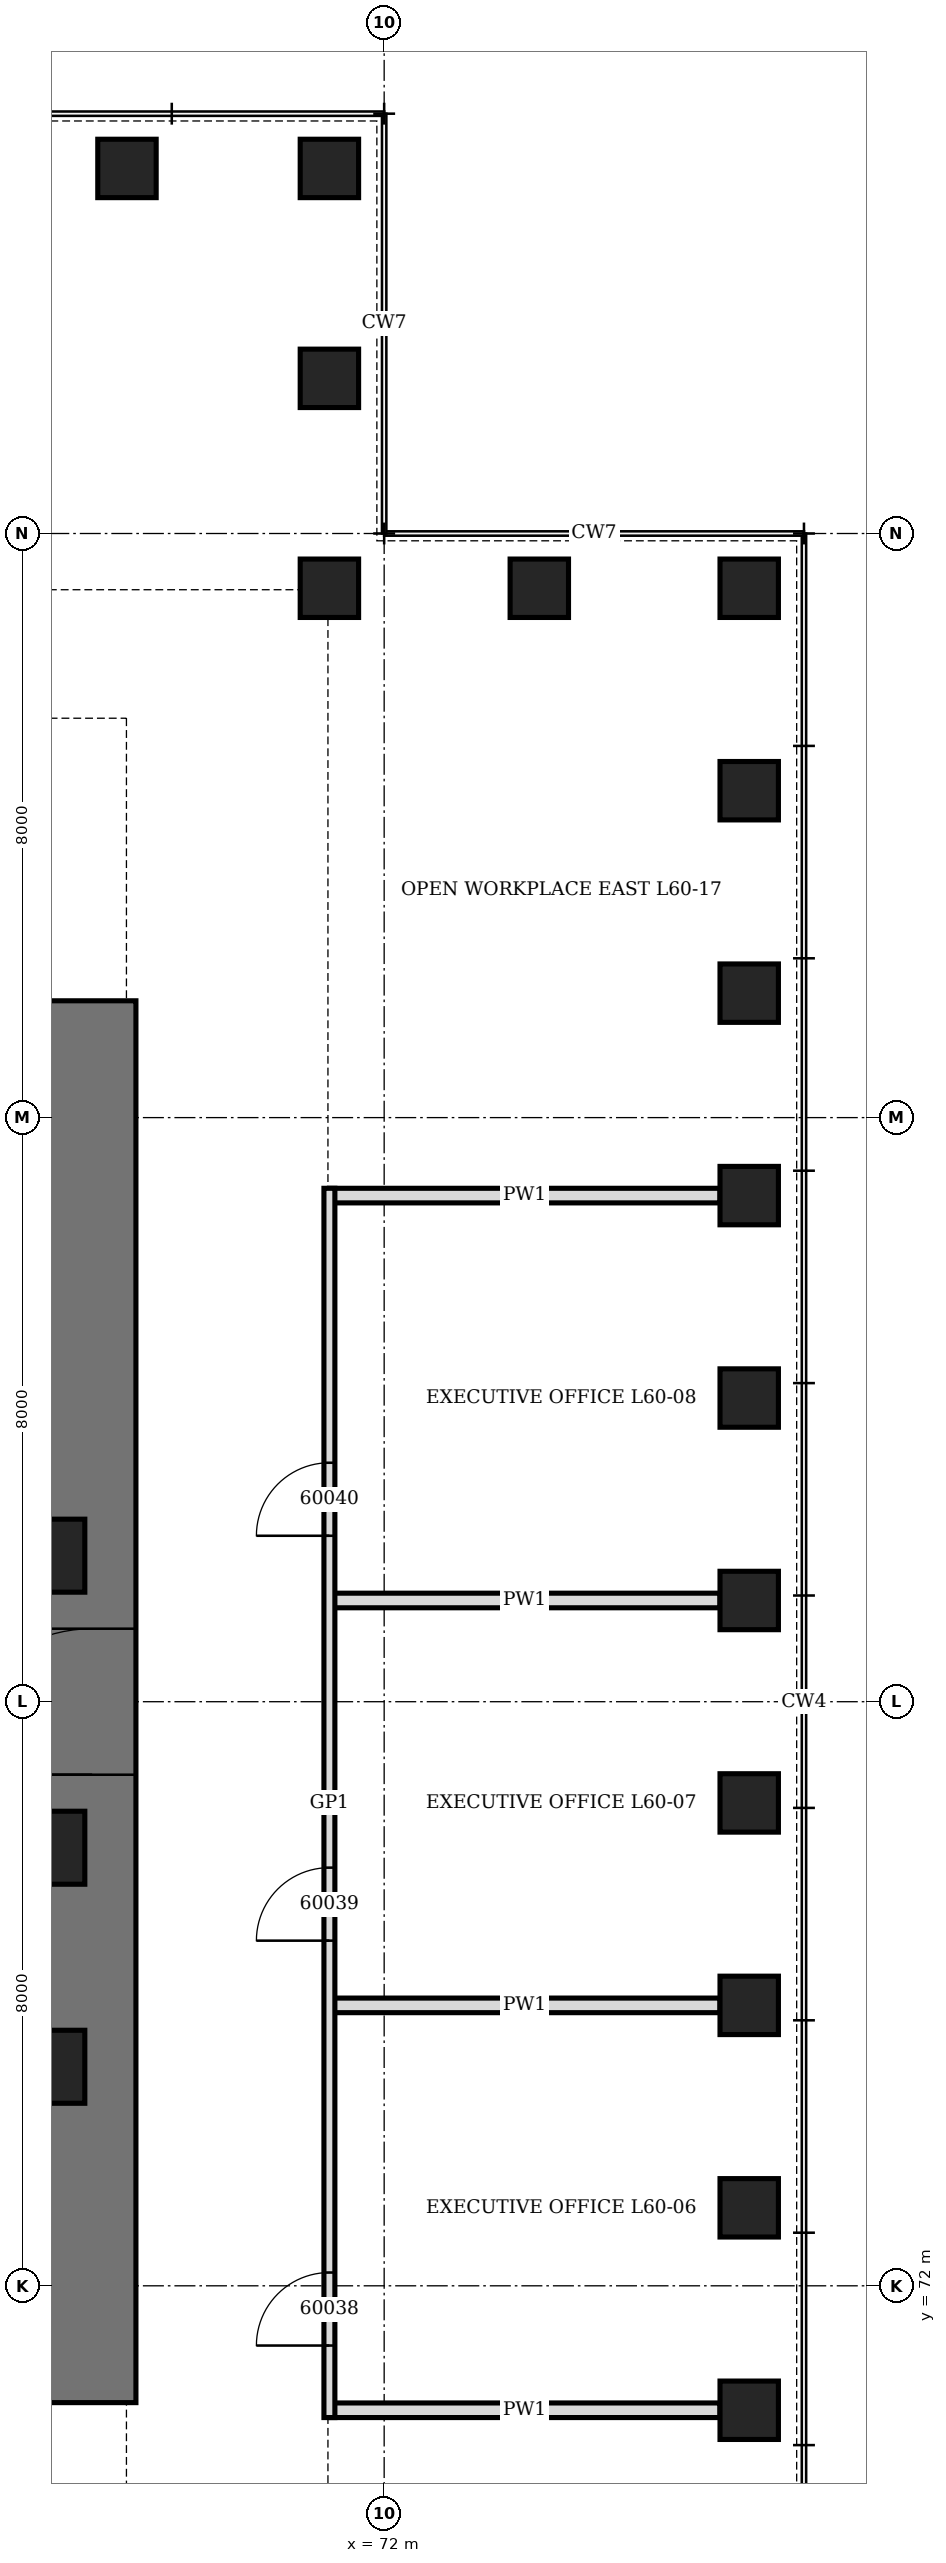
"""IFC4 building model, lengths in metres.
Left out: names, types, materials, properties, quantities, classifications, styles, units other than length and angle.
Written with IfcOpenShell. Run it as: python <this file> out.ifc"""

import sys

from ifc_helpers import new_model, si_unit, direction, frame, frame_2d, origin, origin_2d, place, context, subcontext, project, spatial, rectangle, hollow_rectangle, extrude, element, fill, save


model = new_model("IFC4")
c1 = context("Model", 3, precision=1e-05, world=origin(), true_north=direction((0.0, 1.0)))
c2 = subcontext(c1, "Body", "Model", "MODEL_VIEW")
j1 = project(units=[si_unit("LENGTHUNIT", "METRE"), si_unit("PLANEANGLEUNIT", "RADIAN")], contexts=[c1])
p1 = place(None, origin())
s1 = spatial("IfcSite", under=j1, at=p1, CompositionType="ELEMENT")
p2 = place(p1, origin())
s2 = spatial("IfcBuilding", under=s1, at=p2, CompositionType="ELEMENT")
p3 = place(p2, frame((0.0, 0.0, 267.1)))
s3 = spatial("IfcBuildingStorey", under=s2, at=p3, CompositionType="ELEMENT", Elevation=267.1)
for number, where, z_axis, x_axis in (
    (1, (77.0, 70.295, 0.0), (0.0, 0.0, 1.0), (0.0, 1.0, 0.0)),
    (2, (77.0, 73.068, 0.0), (0.0, 0.0, 1.0), (0.0, 1.0, 0.0)),
    (3, (77.0, 75.841, 0.0), (0.0, 0.0, 1.0), (0.0, 1.0, 0.0)),
    (4, (77.0, 78.614, 0.0), (0.0, 0.0, 1.0), (0.0, 1.0, 0.0)),
    (5, (77.0, 81.386, 0.0), (0.0, 0.0, 1.0), (0.0, 1.0, 0.0)),
    (6, (77.0, 84.159, 0.0), (0.0, 0.0, 1.0), (0.0, 1.0, 0.0)),
    (7, (77.0, 86.932, 0.0), (0.0, 0.0, 1.0), (0.0, 1.0, 0.0)),
    (8, (77.0, 89.705, 0.0), (0.0, 0.0, 1.0), (0.0, 1.0, 0.0)),
    (9, (77.0, 92.477, 0.0), (0.0, 0.0, 1.0), (0.0, 1.0, 0.0)),
    (10, (77.0, 95.25, 0.0), (0.0, 0.0, 1.0), (1.0, 0.0, 0.0)),
    (11, (74.125, 95.25, 0.0), (0.0, 0.0, 1.0), (1.0, 0.0, 0.0)),
    (12, (71.25, 95.25, 0.0), (0.0, 0.0, 1.0), (0.0, 1.0, 0.0)),
    (13, (71.25, 98.125, 0.0), (0.0, 0.0, 1.0), (0.0, 1.0, 0.0)),
    (14, (71.25, 101.0, 0.0), (0.0, 0.0, 1.0), (1.0, 0.0, 0.0)),
    (15, (68.477, 101.0, 0.0), (0.0, 0.0, 1.0), (1.0, 0.0, 0.0)),
):
    element("IfcColumn", number, at=place(p3, frame(where, z_axis=z_axis, x_axis=x_axis)), inside=s3, PredefinedType="COLUMN", context=c2, shape_type="SweptSolid", body=[
        extrude(hollow_rectangle(XDim=0.8, YDim=0.8, WallThickness=0.1, at=origin_2d()), origin(), (0.0, 0.0, 1.0), 4.2),
    ])
p4 = place(p3, frame((68.0, 70.4, 0.0), z_axis=(0.0, 0.0, 1.0), x_axis=(0.0, 1.0, 0.0)))
e16 = element("IfcWall", 16, at=p4, inside=s3, PredefinedType="SHEAR", context=c2, shape_type="SweptSolid", body=[
    extrude(rectangle(XDim=19.2, YDim=1.2, at=frame_2d((9.6, 0.0))), origin(), (0.0, 0.0, 1.0), 4.2),
])
p5 = place(p4, frame((8.6, 0.0, 0.0)))
e17 = element("IfcOpeningElement", 17, at=p5, cuts=e16, PredefinedType="OPENING", context=c2, shape_type="SweptSolid", body=[
    extrude(rectangle(XDim=2.0, YDim=2.4, at=frame_2d((1.0, 1.2))), frame((0.0, 0.61, 0.0), z_axis=(0.0, -1.0, 0.0), x_axis=(1.0, 0.0, 0.0)), (0.0, 0.0, 1.0), 1.22),
])
for number, where, z_axis, x_axis in (
    (18, (67.4, 75.0, 0.0), (0.0, 0.0, 1.0), (1.0, 0.0, 0.0)),
    (19, (67.4, 78.0, 0.0), (0.0, 0.0, 1.0), (1.0, 0.0, 0.0)),
    (20, (67.4, 82.0, 0.0), (0.0, 0.0, 1.0), (1.0, 0.0, 0.0)),
):
    element("IfcColumn", number, at=place(p3, frame(where, z_axis=z_axis, x_axis=x_axis)), inside=s3, PredefinedType="COLUMN", context=c2, shape_type="SweptSolid", body=[
        extrude(hollow_rectangle(XDim=1.0, YDim=1.0, WallThickness=0.15, at=origin_2d()), origin(), (0.0, 0.0, 1.0), 4.2),
    ])
for number, where, z_axis, x_axis in (
    (21, (71.25, 70.295, 0.0), (0.0, 0.0, 1.0), (1.0, 0.0, 0.0)),
    (22, (71.25, 75.841, 0.0), (0.0, 0.0, 1.0), (1.0, 0.0, 0.0)),
    (23, (71.25, 81.386, 0.0), (0.0, 0.0, 1.0), (1.0, 0.0, 0.0)),
    (24, (71.25, 86.932, 0.0), (0.0, 0.0, 1.0), (1.0, 0.0, 0.0)),
):
    element("IfcWall", number, at=place(p3, frame(where, z_axis=z_axis, x_axis=x_axis)), inside=s3, PredefinedType="PARTITIONING", context=c2, shape_type="SweptSolid", body=[
        extrude(rectangle(XDim=5.35, YDim=0.2, at=frame_2d((2.675, 0.0))), origin(), (0.0, 0.0, 1.0), 3.428),
    ])
p6 = place(p3, frame((71.25, 70.196, 0.0), z_axis=(0.0, 0.0, 1.0), x_axis=(0.0, 1.0, 0.0)))
e25 = element("IfcWall", 25, at=p6, inside=s3, PredefinedType="PARTITIONING", context=c2, shape_type="SweptSolid", body=[
    extrude(rectangle(XDim=16.836, YDim=0.15, at=frame_2d((8.418, 0.0))), origin(), (0.0, 0.0, 1.0), 4.04),
])
p7 = place(p6, frame((0.986, 0.0, 0.0)))
e26 = element("IfcOpeningElement", 26, at=p7, cuts=e25, PredefinedType="OPENING", context=c2, shape_type="SweptSolid", body=[
    extrude(rectangle(XDim=1.0, YDim=2.1, at=frame_2d((0.5, 1.05))), frame((0.0, 0.085, 0.0), z_axis=(0.0, -1.0, 0.0), x_axis=(1.0, 0.0, 0.0)), (0.0, 0.0, 1.0), 0.17),
])
p8 = place(p6, frame((6.532, 0.0, 0.0)))
e27 = element("IfcOpeningElement", 27, at=p8, cuts=e25, PredefinedType="OPENING", context=c2, shape_type="SweptSolid", body=[
    extrude(rectangle(XDim=1.0, YDim=2.1, at=frame_2d((0.5, 1.05))), frame((0.0, 0.085, 0.0), z_axis=(0.0, -1.0, 0.0), x_axis=(1.0, 0.0, 0.0)), (0.0, 0.0, 1.0), 0.17),
])
p9 = place(p6, frame((12.077, 0.0, 0.0)))
e28 = element("IfcOpeningElement", 28, at=p9, cuts=e25, PredefinedType="OPENING", context=c2, shape_type="SweptSolid", body=[
    extrude(rectangle(XDim=1.0, YDim=2.1, at=frame_2d((0.5, 1.05))), frame((0.0, 0.085, 0.0), z_axis=(0.0, -1.0, 0.0), x_axis=(1.0, 0.0, 0.0)), (0.0, 0.0, 1.0), 0.17),
])
p10 = place(p5, origin())
e29 = element("IfcDoor", 29, at=p10, inside=s3, OperationType="DOUBLE_DOOR_SINGLE_SWING", PredefinedType="DOOR", context=c2, shape_type="SweptSolid", body=[
    extrude(rectangle(XDim=2.0, YDim=2.4, at=frame_2d((1.0, 1.2))), frame((0.0, 0.35, 0.0), z_axis=(0.0, -1.0, 0.0), x_axis=(1.0, 0.0, 0.0)), (0.0, 0.0, 1.0), 0.7),
])
fill(e17, e29)
p11 = place(p7, origin())
e30 = element("IfcDoor", 30, at=p11, inside=s3, OperationType="SINGLE_SWING_LEFT", PredefinedType="DOOR", context=c2, shape_type="SweptSolid", body=[
    extrude(rectangle(XDim=1.0, YDim=2.1, at=frame_2d((0.5, 1.05))), frame((0.0, 0.075, 0.0), z_axis=(0.0, -1.0, 0.0), x_axis=(1.0, 0.0, 0.0)), (0.0, 0.0, 1.0), 0.149),
])
fill(e26, e30)
p12 = place(p8, origin())
e31 = element("IfcDoor", 31, at=p12, inside=s3, OperationType="SINGLE_SWING_LEFT", PredefinedType="DOOR", context=c2, shape_type="SweptSolid", body=[
    extrude(rectangle(XDim=1.0, YDim=2.1, at=frame_2d((0.5, 1.05))), frame((0.0, 0.075, 0.0), z_axis=(0.0, -1.0, 0.0), x_axis=(1.0, 0.0, 0.0)), (0.0, 0.0, 1.0), 0.149),
])
fill(e27, e31)
p13 = place(p9, origin())
e32 = element("IfcDoor", 32, at=p13, inside=s3, OperationType="SINGLE_SWING_LEFT", PredefinedType="DOOR", context=c2, shape_type="SweptSolid", body=[
    extrude(rectangle(XDim=1.0, YDim=2.1, at=frame_2d((0.5, 1.05))), frame((0.0, 0.075, 0.0), z_axis=(0.0, -1.0, 0.0), x_axis=(1.0, 0.0, 0.0)), (0.0, 0.0, 1.0), 0.149),
])
fill(e28, e32)
save(model, sys.argv[1])
